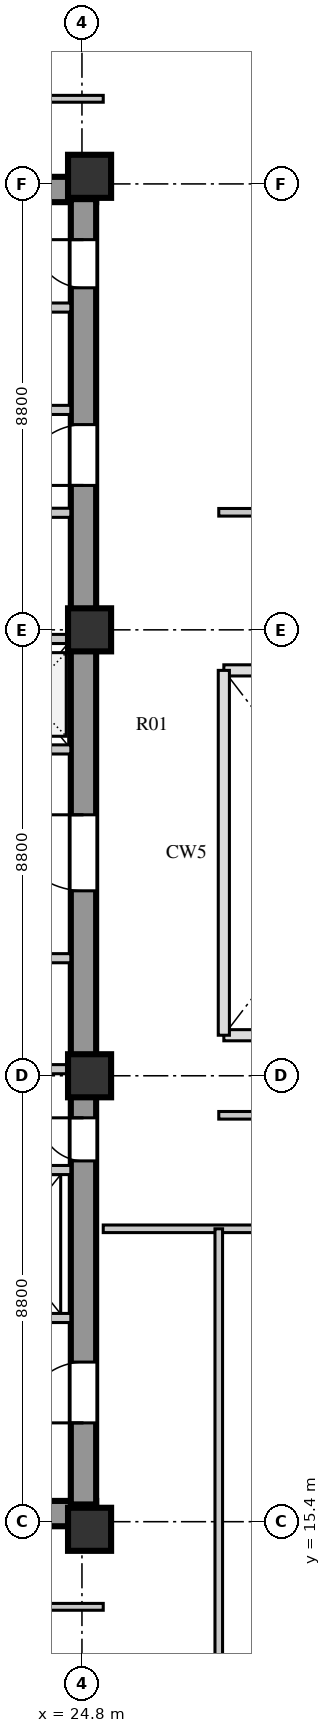
"""IFC4 building model, lengths in metres.
Left out: names, types, materials, properties, quantities, classifications, styles, units other than length and angle.
Written with IfcOpenShell. Run it as: python <this file> out.ifc"""

import sys

from ifc_helpers import new_model, si_unit, direction, frame, frame_2d, origin, origin_2d, place, context, subcontext, project, spatial, rectangle, extrude, element, fill, save


model = new_model("IFC4")
c1 = context("Model", 3, precision=1e-05, world=origin(), true_north=direction((0.0, 1.0)))
c2 = subcontext(c1, "Body", "Model", "MODEL_VIEW")
j1 = project(units=[si_unit("LENGTHUNIT", "METRE"), si_unit("PLANEANGLEUNIT", "RADIAN")], contexts=[c1])
p1 = place(None, origin())
s1 = spatial("IfcSite", under=j1, at=p1, CompositionType="ELEMENT")
p2 = place(p1, origin())
s2 = spatial("IfcBuilding", under=s1, at=p2, CompositionType="ELEMENT")
p3 = place(p2, frame((0.0, 0.0, 208.9)))
s3 = spatial("IfcBuildingStorey", under=s2, at=p3, CompositionType="ELEMENT", Elevation=208.9)
for number, where, z_axis, x_axis in (
    (1, (15.4, 15.56, 0.0), (0.0, 0.0, 1.0), (1.0, 0.0, 0.0)),
    (2, (15.4, 41.69, 0.0), (0.0, 0.0, 1.0), (1.0, 0.0, 0.0)),
):
    element("IfcWall", number, at=place(p3, frame(where, z_axis=z_axis, x_axis=x_axis)), inside=s3, PredefinedType="SHEAR", context=c2, shape_type="SweptSolid", body=[
        extrude(rectangle(XDim=9.68, YDim=0.5, at=frame_2d((4.84, 0.0))), origin(), (0.0, 0.0, 1.0), 4.96),
    ])
p4 = place(p3, frame((24.83, 15.74, 0.0), z_axis=(0.0, 0.0, 1.0), x_axis=(0.0, 1.0, 0.0)))
e3 = element("IfcWall", 3, at=p4, inside=s3, PredefinedType="SHEAR", context=c2, shape_type="SweptSolid", body=[
    extrude(rectangle(XDim=25.76, YDim=0.5, at=frame_2d((12.88, 0.0))), origin(), (0.0, 0.0, 1.0), 4.96),
])
p5 = place(p4, frame((1.61, 0.0, 0.0)))
e4 = element("IfcOpeningElement", 4, at=p5, cuts=e3, PredefinedType="OPENING", context=c2, shape_type="SweptSolid", body=[
    extrude(rectangle(XDim=1.2, YDim=2.1, at=frame_2d((0.6, 1.05))), frame((0.0, 0.26, 0.0), z_axis=(0.0, -1.0, 0.0), x_axis=(1.0, 0.0, 0.0)), (0.0, 0.0, 1.0), 0.52),
])
p6 = place(p4, frame((6.78, 0.0, 0.0)))
e5 = element("IfcOpeningElement", 5, at=p6, cuts=e3, PredefinedType="OPENING", context=c2, shape_type="SweptSolid", body=[
    extrude(rectangle(XDim=0.85, YDim=2.06, at=frame_2d((0.425, 1.03))), frame((0.0, 0.26, 0.0), z_axis=(0.0, -1.0, 0.0), x_axis=(1.0, 0.0, 0.0)), (0.0, 0.0, 1.0), 0.52),
])
p7 = place(p4, frame((12.11, 0.0, 0.0)))
e6 = element("IfcOpeningElement", 6, at=p7, cuts=e3, PredefinedType="OPENING", context=c2, shape_type="SweptSolid", body=[
    extrude(rectangle(XDim=1.5, YDim=2.12, at=frame_2d((0.75, 1.06))), frame((0.0, 0.26, 0.0), z_axis=(0.0, -1.0, 0.0), x_axis=(1.0, 0.0, 0.0)), (0.0, 0.0, 1.0), 0.52),
])
p8 = place(p4, frame((20.11, 0.0, 0.0)))
e7 = element("IfcOpeningElement", 7, at=p8, cuts=e3, PredefinedType="OPENING", context=c2, shape_type="SweptSolid", body=[
    extrude(rectangle(XDim=1.2, YDim=2.12, at=frame_2d((0.6, 1.06))), frame((0.0, 0.26, 0.0), z_axis=(0.0, -1.0, 0.0), x_axis=(1.0, 0.0, 0.0)), (0.0, 0.0, 1.0), 0.52),
])
p9 = place(p4, frame((24.01, 0.0, 0.0)))
e8 = element("IfcOpeningElement", 8, at=p9, cuts=e3, PredefinedType="OPENING", context=c2, shape_type="SweptSolid", body=[
    extrude(rectangle(XDim=0.95, YDim=2.1, at=frame_2d((0.475, 1.05))), frame((0.0, 0.26, 0.0), z_axis=(0.0, -1.0, 0.0), x_axis=(1.0, 0.0, 0.0)), (0.0, 0.0, 1.0), 0.52),
])
for number, where, z_axis, x_axis in (
    (9, (24.95, 15.25, 0.0), (0.0, 0.0, 1.0), (1.0, 0.0, 0.0)),
    (10, (24.95, 24.2, 0.0), (0.0, 0.0, 1.0), (1.0, 0.0, 0.0)),
    (11, (24.95, 33.0, 0.0), (0.0, 0.0, 1.0), (1.0, 0.0, 0.0)),
    (12, (24.95, 41.95, 0.0), (0.0, 0.0, 1.0), (1.0, 0.0, 0.0)),
):
    element("IfcColumn", number, at=place(p3, frame(where, z_axis=z_axis, x_axis=x_axis)), inside=s3, PredefinedType="COLUMN", context=c2, shape_type="SweptSolid", body=[
        extrude(rectangle(XDim=0.85, YDim=0.85, at=origin_2d()), origin(), (0.0, 0.0, 1.0), 4.96),
    ])
p10 = place(p3, frame((19.64, 19.42, 0.0), z_axis=(0.0, 0.0, 1.0), x_axis=(1.0, 0.0, 0.0)))
e13 = element("IfcWall", 13, at=p10, inside=s3, PredefinedType="SOLIDWALL", context=c2, shape_type="SweptSolid", body=[
    extrude(rectangle(XDim=4.94, YDim=0.18, at=frame_2d((2.47, 0.0))), origin(), (0.0, 0.0, 1.0), 4.96),
])
p11 = place(p10, frame((0.72, 0.0, 0.0)))
e14 = element("IfcOpeningElement", 14, at=p11, cuts=e13, PredefinedType="OPENING", context=c2, shape_type="SweptSolid", body=[
    extrude(rectangle(XDim=1.1, YDim=2.1, at=frame_2d((0.55, 1.05))), frame((0.0, 0.1, 0.0), z_axis=(0.0, -1.0, 0.0), x_axis=(1.0, 0.0, 0.0)), (0.0, 0.0, 1.0), 0.2),
])
p12 = place(p10, frame((3.02, 0.0, 0.0)))
e15 = element("IfcOpeningElement", 15, at=p12, cuts=e13, PredefinedType="OPENING", context=c2, shape_type="SweptSolid", body=[
    extrude(rectangle(XDim=1.1, YDim=2.1, at=frame_2d((0.55, 1.05))), frame((0.0, 0.1, 0.0), z_axis=(0.0, -1.0, 0.0), x_axis=(1.0, 0.0, 0.0)), (0.0, 0.0, 1.0), 0.2),
])
p13 = place(p3, frame((19.64, 22.34, 0.0), z_axis=(0.0, 0.0, 1.0), x_axis=(1.0, 0.0, 0.0)))
e16 = element("IfcWall", 16, at=p13, inside=s3, PredefinedType="SOLIDWALL", context=c2, shape_type="SweptSolid", body=[
    extrude(rectangle(XDim=4.94, YDim=0.18, at=frame_2d((2.47, 0.0))), origin(), (0.0, 0.0, 1.0), 4.96),
])
p14 = place(p3, frame((15.9, 26.52, 0.0), z_axis=(0.0, 0.0, 1.0), x_axis=(1.0, 0.0, 0.0)))
e17 = element("IfcWall", 17, at=p14, inside=s3, PredefinedType="SOLIDWALL", context=c2, shape_type="SweptSolid", body=[
    extrude(rectangle(XDim=8.68, YDim=0.18, at=frame_2d((4.34, 0.0))), origin(), (0.0, 0.0, 1.0), 4.96),
])
p15 = place(p14, frame((3.3, 0.0, 0.0)))
e18 = element("IfcOpeningElement", 18, at=p15, cuts=e17, PredefinedType="OPENING", context=c2, shape_type="SweptSolid", body=[
    extrude(rectangle(XDim=0.95, YDim=2.1, at=frame_2d((0.475, 1.05))), frame((0.0, 0.1, 0.0), z_axis=(0.0, -1.0, 0.0), x_axis=(1.0, 0.0, 0.0)), (0.0, 0.0, 1.0), 0.2),
])
p16 = place(p3, frame((15.9, 24.33, 0.0), z_axis=(0.0, 0.0, 1.0), x_axis=(1.0, 0.0, 0.0)))
e19 = element("IfcWall", 19, at=p16, inside=s3, PredefinedType="SOLIDWALL", context=c2, shape_type="SweptSolid", body=[
    extrude(rectangle(XDim=8.68, YDim=0.18, at=frame_2d((4.34, 0.0))), origin(), (0.0, 0.0, 1.0), 4.31),
])
p17 = place(p3, frame((15.9, 30.64, 0.0), z_axis=(0.0, 0.0, 1.0), x_axis=(1.0, 0.0, 0.0)))
e20 = element("IfcWall", 20, at=p17, inside=s3, PredefinedType="SOLIDWALL", context=c2, shape_type="SweptSolid", body=[
    extrude(rectangle(XDim=8.68, YDim=0.18, at=frame_2d((4.34, 0.0))), origin(), (0.0, 0.0, 1.0), 4.96),
])
p18 = place(p17, frame((1.76, 0.0, 0.0)))
e21 = element("IfcOpeningElement", 21, at=p18, cuts=e20, PredefinedType="OPENING", context=c2, shape_type="SweptSolid", body=[
    extrude(rectangle(XDim=1.0, YDim=2.1, at=frame_2d((0.5, 1.05))), frame((0.0, 0.1, 0.0), z_axis=(0.0, -1.0, 0.0), x_axis=(1.0, 0.0, 0.0)), (0.0, 0.0, 1.0), 0.2),
])
p19 = place(p17, frame((3.6, 0.0, 0.0)))
e22 = element("IfcOpeningElement", 22, at=p19, cuts=e20, PredefinedType="OPENING", context=c2, shape_type="SweptSolid", body=[
    extrude(rectangle(XDim=1.0, YDim=2.1, at=frame_2d((0.5, 1.05))), frame((0.0, 0.1, 0.0), z_axis=(0.0, -1.0, 0.0), x_axis=(1.0, 0.0, 0.0)), (0.0, 0.0, 1.0), 0.2),
])
p20 = place(p17, frame((5.44, 0.0, 0.0)))
e23 = element("IfcOpeningElement", 23, at=p20, cuts=e20, PredefinedType="OPENING", context=c2, shape_type="SweptSolid", body=[
    extrude(rectangle(XDim=1.0, YDim=2.1, at=frame_2d((0.5, 1.05))), frame((0.0, 0.1, 0.0), z_axis=(0.0, -1.0, 0.0), x_axis=(1.0, 0.0, 0.0)), (0.0, 0.0, 1.0), 0.2),
])
p21 = place(p17, frame((7.28, 0.0, 0.0)))
e24 = element("IfcOpeningElement", 24, at=p21, cuts=e20, PredefinedType="OPENING", context=c2, shape_type="SweptSolid", body=[
    extrude(rectangle(XDim=1.0, YDim=2.1, at=frame_2d((0.5, 1.05))), frame((0.0, 0.1, 0.0), z_axis=(0.0, -1.0, 0.0), x_axis=(1.0, 0.0, 0.0)), (0.0, 0.0, 1.0), 0.2),
])
p22 = place(p3, frame((15.9, 32.82, 0.0), z_axis=(0.0, 0.0, 1.0), x_axis=(1.0, 0.0, 0.0)))
e25 = element("IfcWall", 25, at=p22, inside=s3, PredefinedType="SOLIDWALL", context=c2, shape_type="SweptSolid", body=[
    extrude(rectangle(XDim=8.68, YDim=0.18, at=frame_2d((4.34, 0.0))), origin(), (0.0, 0.0, 1.0), 4.31),
])
p23 = place(p3, frame((22.02, 35.31, 0.0), z_axis=(0.0, 0.0, 1.0), x_axis=(1.0, 0.0, 0.0)))
e26 = element("IfcWall", 26, at=p23, inside=s3, PredefinedType="SOLIDWALL", context=c2, shape_type="SweptSolid", body=[
    extrude(rectangle(XDim=2.56, YDim=0.18, at=frame_2d((1.28, 0.0))), origin(), (0.0, 0.0, 1.0), 4.96),
])
p24 = place(p23, frame((0.55, 0.0, 0.0)))
e27 = element("IfcOpeningElement", 27, at=p24, cuts=e26, PredefinedType="OPENING", context=c2, shape_type="SweptSolid", body=[
    extrude(rectangle(XDim=1.0, YDim=2.1, at=frame_2d((0.5, 1.05))), frame((0.0, 0.1, 0.0), z_axis=(0.0, -1.0, 0.0), x_axis=(1.0, 0.0, 0.0)), (0.0, 0.0, 1.0), 0.2),
])
p25 = place(p3, frame((19.64, 37.34, 0.0), z_axis=(0.0, 0.0, 1.0), x_axis=(1.0, 0.0, 0.0)))
e28 = element("IfcWall", 28, at=p25, inside=s3, PredefinedType="SOLIDWALL", context=c2, shape_type="SweptSolid", body=[
    extrude(rectangle(XDim=4.94, YDim=0.18, at=frame_2d((2.47, 0.0))), origin(), (0.0, 0.0, 1.0), 4.96),
])
p26 = place(p25, frame((0.45, 0.0, 0.0)))
e29 = element("IfcOpeningElement", 29, at=p26, cuts=e28, PredefinedType="OPENING", context=c2, shape_type="SweptSolid", body=[
    extrude(rectangle(XDim=1.0, YDim=2.1, at=frame_2d((0.5, 1.05))), frame((0.0, 0.1, 0.0), z_axis=(0.0, -1.0, 0.0), x_axis=(1.0, 0.0, 0.0)), (0.0, 0.0, 1.0), 0.2),
])
p27 = place(p25, frame((2.5, 0.0, 0.0)))
e30 = element("IfcOpeningElement", 30, at=p27, cuts=e28, PredefinedType="OPENING", context=c2, shape_type="SweptSolid", body=[
    extrude(rectangle(XDim=1.0, YDim=2.1, at=frame_2d((0.5, 1.05))), frame((0.0, 0.1, 0.0), z_axis=(0.0, -1.0, 0.0), x_axis=(1.0, 0.0, 0.0)), (0.0, 0.0, 1.0), 0.2),
])
p28 = place(p3, frame((19.64, 39.36, 0.0), z_axis=(0.0, 0.0, 1.0), x_axis=(1.0, 0.0, 0.0)))
e31 = element("IfcWall", 31, at=p28, inside=s3, PredefinedType="SOLIDWALL", context=c2, shape_type="SweptSolid", body=[
    extrude(rectangle(XDim=4.94, YDim=0.18, at=frame_2d((2.47, 0.0))), origin(), (0.0, 0.0, 1.0), 4.96),
])
p29 = place(p3, frame((14.95, 13.72, 0.0), z_axis=(0.0, 0.0, 1.0), x_axis=(1.0, 0.0, 0.0)))
e32 = element("IfcWall", 32, at=p29, inside=s3, PredefinedType="PARTITIONING", context=c2, shape_type="SweptSolid", body=[
    extrude(rectangle(XDim=10.27, YDim=0.135, at=frame_2d((5.135, 0.0))), origin(), (0.0, 0.0, 1.0), 4.96),
])
p30 = place(p29, frame((3.2, 0.0, 0.0)))
e33 = element("IfcOpeningElement", 33, at=p30, cuts=e32, PredefinedType="OPENING", context=c2, shape_type="SweptSolid", body=[
    extrude(rectangle(XDim=1.0, YDim=2.08, at=frame_2d((0.5, 1.04))), frame((0.0, 0.078, 0.0), z_axis=(0.0, -1.0, 0.0), x_axis=(1.0, 0.0, 0.0)), (0.0, 0.0, 1.0), 0.155),
])
p31 = place(p3, frame((14.95, 43.48, 0.0), z_axis=(0.0, 0.0, 1.0), x_axis=(1.0, 0.0, 0.0)))
e34 = element("IfcWall", 34, at=p31, inside=s3, PredefinedType="PARTITIONING", context=c2, shape_type="SweptSolid", body=[
    extrude(rectangle(XDim=10.27, YDim=0.135, at=frame_2d((5.135, 0.0))), origin(), (0.0, 0.0, 1.0), 4.96),
])
p32 = place(p31, frame((3.2, 0.0, 0.0)))
e35 = element("IfcOpeningElement", 35, at=p32, cuts=e34, PredefinedType="OPENING", context=c2, shape_type="SweptSolid", body=[
    extrude(rectangle(XDim=1.0, YDim=2.08, at=frame_2d((0.5, 1.04))), frame((0.0, 0.078, 0.0), z_axis=(0.0, -1.0, 0.0), x_axis=(1.0, 0.0, 0.0)), (0.0, 0.0, 1.0), 0.155),
])
p33 = place(p3, frame((25.22, 21.18, 0.0), z_axis=(0.0, 0.0, 1.0), x_axis=(1.0, 0.0, 0.0)))
e36 = element("IfcWall", 36, at=p33, inside=s3, PredefinedType="PARTITIONING", context=c2, shape_type="SweptSolid", body=[
    extrude(rectangle(XDim=15.6, YDim=0.15, at=frame_2d((7.8, 0.0))), origin(), (0.0, 0.0, 1.0), 4.61),
])
p34 = place(p33, frame((5.4, 0.0, 0.0)))
e37 = element("IfcOpeningElement", 37, at=p34, cuts=e36, PredefinedType="OPENING", context=c2, shape_type="SweptSolid", body=[
    extrude(rectangle(XDim=1.35, YDim=2.1, at=frame_2d((0.675, 1.05))), frame((0.0, 0.085, 0.0), z_axis=(0.0, -1.0, 0.0), x_axis=(1.0, 0.0, 0.0)), (0.0, 0.0, 1.0), 0.17),
])
p35 = place(p3, frame((27.5, 7.88, 0.0), z_axis=(0.0, 0.0, 1.0), x_axis=(0.0, 1.0, 0.0)))
e38 = element("IfcWall", 38, at=p35, inside=s3, PredefinedType="PARTITIONING", context=c2, shape_type="SweptSolid", body=[
    extrude(rectangle(XDim=13.3, YDim=0.15, at=frame_2d((6.65, 0.0))), origin(), (0.0, 0.0, 1.0), 4.96),
])
p36 = place(p3, frame((27.5, 23.42, 0.0), z_axis=(0.0, 0.0, 1.0), x_axis=(1.0, 0.0, 0.0)))
e39 = element("IfcWall", 39, at=p36, inside=s3, PredefinedType="PARTITIONING", context=c2, shape_type="SweptSolid", body=[
    extrude(rectangle(XDim=5.65, YDim=0.15, at=frame_2d((2.825, 0.0))), origin(), (0.0, 0.0, 1.0), 4.96),
])
p37 = place(p3, frame((27.5, 35.32, 0.0), z_axis=(0.0, 0.0, 1.0), x_axis=(1.0, 0.0, 0.0)))
e40 = element("IfcWall", 40, at=p37, inside=s3, PredefinedType="PARTITIONING", context=c2, shape_type="SweptSolid", body=[
    extrude(rectangle(XDim=7.22, YDim=0.15, at=frame_2d((3.61, 0.0))), origin(), (0.0, 0.0, 1.0), 4.96),
])
p38 = place(p37, frame((2.4, 0.0, 0.0)))
e41 = element("IfcOpeningElement", 41, at=p38, cuts=e40, PredefinedType="OPENING", context=c2, shape_type="SweptSolid", body=[
    extrude(rectangle(XDim=1.2, YDim=2.1, at=frame_2d((0.6, 1.05))), frame((0.0, 0.085, 0.0), z_axis=(0.0, -1.0, 0.0), x_axis=(1.0, 0.0, 0.0)), (0.0, 0.0, 1.0), 0.17),
])
p39 = place(p5, frame((1.2, 0.0, 0.0), z_axis=(0.0, 0.0, 1.0), x_axis=(-1.0, 0.0, 0.0)))
e42 = element("IfcDoor", 42, at=p39, inside=s3, OperationType="SINGLE_SWING_RIGHT", PredefinedType="DOOR", context=c2, shape_type="SweptSolid", body=[
    extrude(rectangle(XDim=1.2, YDim=2.1, at=frame_2d((0.6, 1.05))), frame((0.0, 0.025, 0.0), z_axis=(0.0, -1.0, 0.0), x_axis=(1.0, 0.0, 0.0)), (0.0, 0.0, 1.0), 0.05),
])
fill(e4, e42)
p40 = place(p6, frame((0.85, 0.0, 0.0), z_axis=(0.0, 0.0, 1.0), x_axis=(-1.0, 0.0, 0.0)))
e43 = element("IfcDoor", 43, at=p40, inside=s3, OperationType="SINGLE_SWING_LEFT", PredefinedType="DOOR", context=c2, shape_type="SweptSolid", body=[
    extrude(rectangle(XDim=0.85, YDim=2.06, at=frame_2d((0.425, 1.03))), frame((0.0, 0.025, 0.0), z_axis=(0.0, -1.0, 0.0), x_axis=(1.0, 0.0, 0.0)), (0.0, 0.0, 1.0), 0.05),
])
fill(e5, e43)
p41 = place(p7, frame((1.5, 0.0, 0.0), z_axis=(0.0, 0.0, 1.0), x_axis=(-1.0, 0.0, 0.0)))
e44 = element("IfcDoor", 44, at=p41, inside=s3, OperationType="SINGLE_SWING_LEFT", PredefinedType="DOOR", context=c2, shape_type="SweptSolid", body=[
    extrude(rectangle(XDim=1.5, YDim=2.12, at=frame_2d((0.75, 1.06))), frame((0.0, 0.025, 0.0), z_axis=(0.0, -1.0, 0.0), x_axis=(1.0, 0.0, 0.0)), (0.0, 0.0, 1.0), 0.05),
])
fill(e6, e44)
p42 = place(p8, frame((1.2, 0.0, 0.0), z_axis=(0.0, 0.0, 1.0), x_axis=(-1.0, 0.0, 0.0)))
e45 = element("IfcDoor", 45, at=p42, inside=s3, OperationType="SINGLE_SWING_RIGHT", PredefinedType="DOOR", context=c2, shape_type="SweptSolid", body=[
    extrude(rectangle(XDim=1.2, YDim=2.12, at=frame_2d((0.6, 1.06))), frame((0.0, 0.025, 0.0), z_axis=(0.0, -1.0, 0.0), x_axis=(1.0, 0.0, 0.0)), (0.0, 0.0, 1.0), 0.05),
])
fill(e7, e45)
p43 = place(p9, frame((0.95, 0.0, 0.0), z_axis=(0.0, 0.0, 1.0), x_axis=(-1.0, 0.0, 0.0)))
e46 = element("IfcDoor", 46, at=p43, inside=s3, OperationType="SINGLE_SWING_LEFT", PredefinedType="DOOR", context=c2, shape_type="SweptSolid", body=[
    extrude(rectangle(XDim=0.95, YDim=2.1, at=frame_2d((0.475, 1.05))), frame((0.0, 0.025, 0.0), z_axis=(0.0, -1.0, 0.0), x_axis=(1.0, 0.0, 0.0)), (0.0, 0.0, 1.0), 0.05),
])
fill(e8, e46)
save(model, sys.argv[1])
